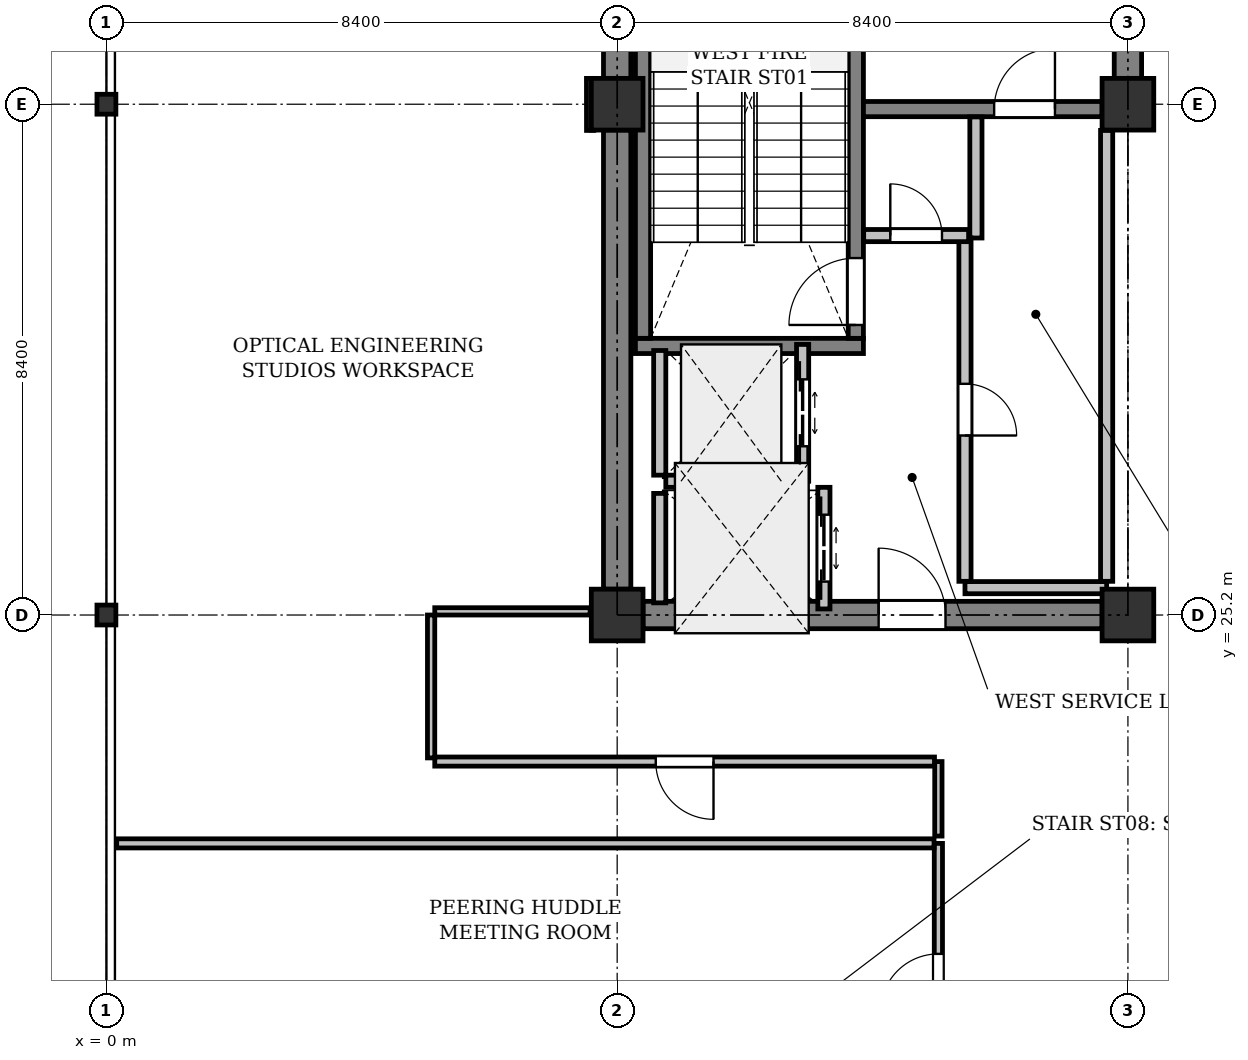
"""IFC4 building model, lengths in metres.
Left out: names, types, materials, properties, quantities, classifications, styles, units other than length and angle.
Written with IfcOpenShell. Run it as: python <this file> out.ifc"""

import sys

from ifc_helpers import new_model, si_unit, direction, frame, frame_2d, origin, origin_2d, place, context, subcontext, project, spatial, rectangle, i_section, extrude, element, fill, save


model = new_model("IFC4")
c1 = context("Model", 3, precision=1e-05, world=origin(), true_north=direction((0.0, 1.0)))
c2 = subcontext(c1, "Body", "Model", "MODEL_VIEW")
j1 = project(units=[si_unit("LENGTHUNIT", "METRE"), si_unit("PLANEANGLEUNIT", "RADIAN")], contexts=[c1])
p1 = place(None, origin())
s1 = spatial("IfcSite", under=j1, at=p1, CompositionType="ELEMENT")
p2 = place(p1, origin())
s2 = spatial("IfcBuilding", under=s1, at=p2, CompositionType="ELEMENT")
p3 = place(p2, frame((0.0, 0.0, 314.2)))
s3 = spatial("IfcBuildingStorey", under=s2, at=p3, CompositionType="ELEMENT", Elevation=314.2)
for number, where, z_axis, x_axis in (
    (1, (0.0, 25.2, 0.0), (0.0, 0.0, 1.0), (1.0, 0.0, 0.0)),
    (2, (0.0, 33.6, 0.0), (0.0, 0.0, 1.0), (1.0, 0.0, 0.0)),
):
    element("IfcColumn", number, at=place(p3, frame(where, z_axis=z_axis, x_axis=x_axis)), inside=s3, PredefinedType="COLUMN", context=c2, shape_type="SweptSolid", body=[
        extrude(i_section(OverallWidth=0.311, OverallDepth=0.327, WebThickness=0.016, FlangeThickness=0.025, FilletRadius=0.017, at=origin_2d()), origin(), (0.0, 0.0, 1.0), 4.0),
    ])
for number, where, z_axis, x_axis in (
    (3, (8.4, 25.2, 0.0), (0.0, 0.0, 1.0), (1.0, 0.0, 0.0)),
    (4, (8.4, 33.6, 0.0), (0.0, 0.0, 1.0), (1.0, 0.0, 0.0)),
    (5, (16.8, 25.2, 0.0), (0.0, 0.0, 1.0), (1.0, 0.0, 0.0)),
    (6, (16.8, 33.6, 0.0), (0.0, 0.0, 1.0), (1.0, 0.0, 0.0)),
):
    element("IfcColumn", number, at=place(p3, frame(where, z_axis=z_axis, x_axis=x_axis)), inside=s3, PredefinedType="COLUMN", context=c2, shape_type="SweptSolid", body=[
        extrude(rectangle(XDim=0.85, YDim=0.85, at=origin_2d()), origin(), (0.0, 0.0, 1.0), 4.0),
    ])
for number, where, z_axis, x_axis in (
    (7, (8.4, 25.625, 0.0), (0.0, 0.0, 1.0), (0.0, 1.0, 0.0)),
    (8, (8.4, 34.025, 0.0), (0.0, 0.0, 1.0), (0.0, 1.0, 0.0)),
):
    element("IfcWall", number, at=place(p3, frame(where, z_axis=z_axis, x_axis=x_axis)), inside=s3, PredefinedType="SHEAR", context=c2, shape_type="SweptSolid", body=[
        extrude(rectangle(XDim=7.55, YDim=0.45, at=frame_2d((3.775, 0.0))), origin(), (0.0, 0.0, 1.0), 3.725),
    ])
p4 = place(p3, frame((16.8, 34.025, 0.0), z_axis=(0.0, 0.0, 1.0), x_axis=(0.0, 1.0, 0.0)))
e9 = element("IfcWall", 9, at=p4, inside=s3, PredefinedType="SHEAR", context=c2, shape_type="SweptSolid", body=[
    extrude(rectangle(XDim=7.55, YDim=0.45, at=frame_2d((3.775, 0.0))), origin(), (0.0, 0.0, 1.0), 3.725),
])
p5 = place(p4, frame((1.075, 0.0, 0.0)))
e10 = element("IfcOpeningElement", 10, at=p5, cuts=e9, PredefinedType="OPENING", context=c2, shape_type="SweptSolid", body=[
    extrude(rectangle(XDim=1.1, YDim=2.15, at=frame_2d((0.55, 1.075))), frame((0.0, 0.235, 0.0), z_axis=(0.0, -1.0, 0.0), x_axis=(1.0, 0.0, 0.0)), (0.0, 0.0, 1.0), 0.47),
])
p6 = place(p3, frame((8.825, 25.2, 0.0), z_axis=(0.0, 0.0, 1.0), x_axis=(1.0, 0.0, 0.0)))
e11 = element("IfcWall", 11, at=p6, inside=s3, PredefinedType="SHEAR", context=c2, shape_type="SweptSolid", body=[
    extrude(rectangle(XDim=7.55, YDim=0.45, at=frame_2d((3.775, 0.0))), origin(), (0.0, 0.0, 1.0), 3.725),
])
p7 = place(p6, frame((3.875, 0.0, 0.0)))
e12 = element("IfcOpeningElement", 12, at=p7, cuts=e11, PredefinedType="OPENING", context=c2, shape_type="SweptSolid", body=[
    extrude(rectangle(XDim=1.1, YDim=2.15, at=frame_2d((0.55, 1.075))), frame((0.0, 0.235, 0.0), z_axis=(0.0, -1.0, 0.0), x_axis=(1.0, 0.0, 0.0)), (0.0, 0.0, 1.0), 0.47),
])
p8 = place(p3, frame((12.45, 29.625, 0.0), z_axis=(0.0, 0.0, 1.0), x_axis=(-1.0, 0.0, 0.0)))
e13 = element("IfcWall", 13, at=p8, inside=s3, PredefinedType="SHEAR", context=c2, shape_type="SweptSolid", body=[
    extrude(rectangle(XDim=3.75, YDim=0.25, at=frame_2d((1.875, 0.0))), origin(), (0.0, 0.0, 1.0), 3.725),
])
p9 = place(p3, frame((12.325, 29.75, 0.0), z_axis=(0.0, 0.0, 1.0), x_axis=(0.0, 1.0, 0.0)))
e14 = element("IfcWall", 14, at=p9, inside=s3, PredefinedType="SHEAR", context=c2, shape_type="SweptSolid", body=[
    extrude(rectangle(XDim=7.75, YDim=0.25, at=frame_2d((3.875, 0.0))), origin(), (0.0, 0.0, 1.0), 3.725),
])
p10 = place(p9, frame((0.22, 0.0, 0.0)))
e15 = element("IfcOpeningElement", 15, at=p10, cuts=e14, PredefinedType="OPENING", context=c2, shape_type="SweptSolid", body=[
    extrude(rectangle(XDim=1.1, YDim=2.15, at=frame_2d((0.55, 1.075))), frame((0.0, 0.135, 0.0), z_axis=(0.0, -1.0, 0.0), x_axis=(1.0, 0.0, 0.0)), (0.0, 0.0, 1.0), 0.27),
])
p11 = place(p3, frame((8.825, 29.75, 0.0), z_axis=(0.0, 0.0, 1.0), x_axis=(0.0, 1.0, 0.0)))
e16 = element("IfcWall", 16, at=p11, inside=s3, PredefinedType="SHEAR", context=c2, shape_type="SweptSolid", body=[
    extrude(rectangle(XDim=7.75, YDim=0.25, at=frame_2d((3.875, 0.0))), origin(), (0.0, 0.0, 1.0), 3.725),
])
p12 = place(p3, frame((12.45, 33.52, 0.0), z_axis=(0.0, 0.0, 1.0), x_axis=(1.0, 0.0, 0.0)))
e17 = element("IfcWall", 17, at=p12, inside=s3, PredefinedType="SHEAR", context=c2, shape_type="SweptSolid", body=[
    extrude(rectangle(XDim=3.925, YDim=0.25, at=frame_2d((1.962, 0.0))), origin(), (0.0, 0.0, 1.0), 3.725),
])
p13 = place(p12, frame((2.15, 0.0, 0.0)))
e18 = element("IfcOpeningElement", 18, at=p13, cuts=e17, PredefinedType="OPENING", context=c2, shape_type="SweptSolid", body=[
    extrude(rectangle(XDim=1.0, YDim=2.15, at=frame_2d((0.5, 1.075))), frame((0.0, 0.135, 0.0), z_axis=(0.0, -1.0, 0.0), x_axis=(1.0, 0.0, 0.0)), (0.0, 0.0, 1.0), 0.27),
])
p14 = place(p3, frame((11.45, 27.4, 0.0), z_axis=(0.0, 0.0, 1.0), x_axis=(0.0, 1.0, 0.0)))
e19 = element("IfcWall", 19, at=p14, inside=s3, PredefinedType="PARTITIONING", context=c2, shape_type="SweptSolid", body=[
    extrude(rectangle(XDim=2.25, YDim=0.2, at=frame_2d((1.125, 0.0))), origin(), (0.0, 0.0, 1.0), 3.725),
])
p15 = place(p14, frame((0.575, 0.0, 0.0)))
e20 = element("IfcOpeningElement", 20, at=p15, cuts=e19, PredefinedType="OPENING", context=c2, shape_type="SweptSolid", body=[
    extrude(rectangle(XDim=1.1, YDim=2.2, at=frame_2d((0.55, 1.1))), frame((0.0, 0.11, 0.0), z_axis=(0.0, -1.0, 0.0), x_axis=(1.0, 0.0, 0.0)), (0.0, 0.0, 1.0), 0.22),
])
p16 = place(p3, frame((9.1, 27.5, 0.0), z_axis=(0.0, 0.0, 1.0), x_axis=(0.0, 1.0, 0.0)))
e21 = element("IfcWall", 21, at=p16, inside=s3, PredefinedType="PARTITIONING", context=c2, shape_type="SweptSolid", body=[
    extrude(rectangle(XDim=2.05, YDim=0.2, at=frame_2d((1.025, 0.0))), origin(), (0.0, 0.0, 1.0), 3.725),
])
p17 = place(p3, frame((9.2, 27.4, 0.0), z_axis=(0.0, 0.0, 1.0), x_axis=(1.0, 0.0, 0.0)))
e22 = element("IfcWall", 22, at=p17, inside=s3, PredefinedType="PARTITIONING", context=c2, shape_type="SweptSolid", body=[
    extrude(rectangle(XDim=2.15, YDim=0.2, at=frame_2d((1.075, 0.0))), origin(), (0.0, 0.0, 1.0), 3.725),
])
p18 = place(p3, frame((11.8, 25.3, 0.0), z_axis=(0.0, 0.0, 1.0), x_axis=(0.0, 1.0, 0.0)))
e23 = element("IfcWall", 23, at=p18, inside=s3, PredefinedType="PARTITIONING", context=c2, shape_type="SweptSolid", body=[
    extrude(rectangle(XDim=2.0, YDim=0.2, at=frame_2d((1.0, 0.0))), origin(), (0.0, 0.0, 1.0), 3.725),
])
p19 = place(p18, frame((0.45, 0.0, 0.0)))
e24 = element("IfcOpeningElement", 24, at=p19, cuts=e23, PredefinedType="OPENING", context=c2, shape_type="SweptSolid", body=[
    extrude(rectangle(XDim=1.1, YDim=2.2, at=frame_2d((0.55, 1.1))), frame((0.0, 0.11, 0.0), z_axis=(0.0, -1.0, 0.0), x_axis=(1.0, 0.0, 0.0)), (0.0, 0.0, 1.0), 0.22),
])
p20 = place(p3, frame((9.1, 25.4, 0.0), z_axis=(0.0, 0.0, 1.0), x_axis=(0.0, 1.0, 0.0)))
e25 = element("IfcWall", 25, at=p20, inside=s3, PredefinedType="PARTITIONING", context=c2, shape_type="SweptSolid", body=[
    extrude(rectangle(XDim=1.8, YDim=0.2, at=frame_2d((0.9, 0.0))), origin(), (0.0, 0.0, 1.0), 3.725),
])
p21 = place(p3, frame((14.12, 25.65, 0.0), z_axis=(0.0, 0.0, 1.0), x_axis=(1.0, 0.0, 0.0)))
e26 = element("IfcWall", 26, at=p21, inside=s3, PredefinedType="PARTITIONING", context=c2, shape_type="SweptSolid", body=[
    extrude(rectangle(XDim=2.33, YDim=0.2, at=frame_2d((1.165, 0.0))), origin(), (0.0, 0.0, 1.0), 3.725),
])
p22 = place(p3, frame((16.45, 25.754, 0.0), z_axis=(0.0, 0.0, 1.0), x_axis=(0.0, 1.0, 0.0)))
e27 = element("IfcWall", 27, at=p22, inside=s3, PredefinedType="PARTITIONING", context=c2, shape_type="SweptSolid", body=[
    extrude(rectangle(XDim=7.416, YDim=0.2, at=frame_2d((3.708, 0.0))), origin(), (0.0, 0.0, 1.0), 3.725),
])
p23 = place(p3, frame((14.3, 33.391, 0.0), z_axis=(0.0, 0.0, 1.0), x_axis=(0.0, -1.0, 0.0)))
e28 = element("IfcWall", 28, at=p23, inside=s3, PredefinedType="PARTITIONING", context=c2, shape_type="SweptSolid", body=[
    extrude(rectangle(XDim=1.991, YDim=0.2, at=frame_2d((0.996, 0.0))), origin(), (0.0, 0.0, 1.0), 3.725),
])
p24 = place(p3, frame((14.12, 31.4, 0.0), z_axis=(0.0, 0.0, 1.0), x_axis=(0.0, -1.0, 0.0)))
e29 = element("IfcWall", 29, at=p24, inside=s3, PredefinedType="PARTITIONING", context=c2, shape_type="SweptSolid", body=[
    extrude(rectangle(XDim=5.646, YDim=0.2, at=frame_2d((2.823, 0.0))), origin(), (0.0, 0.0, 1.0), 3.725),
])
p25 = place(p24, frame((2.398, 0.0, 0.0)))
e30 = element("IfcOpeningElement", 30, at=p25, cuts=e29, PredefinedType="OPENING", context=c2, shape_type="SweptSolid", body=[
    extrude(rectangle(XDim=0.85, YDim=2.15, at=frame_2d((0.425, 1.075))), frame((0.0, 0.11, 0.0), z_axis=(0.0, -1.0, 0.0), x_axis=(1.0, 0.0, 0.0)), (0.0, 0.0, 1.0), 0.22),
])
p26 = place(p3, frame((12.454, 31.44, 0.0), z_axis=(0.0, 0.0, 1.0), x_axis=(1.0, 0.0, 0.0)))
e31 = element("IfcWall", 31, at=p26, inside=s3, PredefinedType="PARTITIONING", context=c2, shape_type="SweptSolid", body=[
    extrude(rectangle(XDim=1.726, YDim=0.2, at=frame_2d((0.863, 0.0))), origin(), (0.0, 0.0, 1.0), 3.725),
])
p27 = place(p26, frame((0.438, 0.0, 0.0)))
e32 = element("IfcOpeningElement", 32, at=p27, cuts=e31, PredefinedType="OPENING", context=c2, shape_type="SweptSolid", body=[
    extrude(rectangle(XDim=0.85, YDim=2.15, at=frame_2d((0.425, 1.075))), frame((0.0, 0.11, 0.0), z_axis=(0.0, -1.0, 0.0), x_axis=(1.0, 0.0, 0.0)), (0.0, 0.0, 1.0), 0.22),
])
p28 = place(p3, frame((5.34, 23.214, 0.0), z_axis=(0.0, 0.0, 1.0), x_axis=(-1.0, 0.0, 0.0)))
e33 = element("IfcWall", 33, at=p28, inside=s3, PredefinedType="PARTITIONING", context=c2, shape_type="SweptSolid", body=[
    extrude(rectangle(XDim=5.171, YDim=0.135, at=frame_2d((2.585, 0.0))), origin(), (0.0, 0.0, 1.0), 3.421),
])
p29 = place(p3, frame((0.169, 20.187, 0.0), z_axis=(0.0, 0.0, 1.0), x_axis=(1.0, 0.0, 0.0)))
e34 = element("IfcWall", 34, at=p29, inside=s3, PredefinedType="PARTITIONING", context=c2, shape_type="SweptSolid", body=[
    extrude(rectangle(XDim=13.921, YDim=0.15, at=frame_2d((6.96, 0.0))), origin(), (0.0, 0.0, 1.0), 3.319),
])
p30 = place(p3, frame((14.09, 20.266, 0.0), z_axis=(0.0, 0.0, 1.0), x_axis=(0.0, 1.0, 0.0)))
e35 = element("IfcWall", 35, at=p30, inside=s3, PredefinedType="PARTITIONING", context=c2, shape_type="SweptSolid", body=[
    extrude(rectangle(XDim=2.524, YDim=0.12, at=frame_2d((1.262, 0.0))), origin(), (0.0, 0.0, 1.0), 3.725),
])
p31 = place(p3, frame((14.026, 22.79, 0.0), z_axis=(0.0, 0.0, 1.0), x_axis=(-1.0, 0.0, 0.0)))
e36 = element("IfcWall", 36, at=p31, inside=s3, PredefinedType="PARTITIONING", context=c2, shape_type="SweptSolid", body=[
    extrude(rectangle(XDim=8.626, YDim=0.15, at=frame_2d((4.313, 0.0))), origin(), (0.0, 0.0, 1.0), 3.319),
])
p32 = place(p31, frame((3.838, 0.0, 0.0)))
e37 = element("IfcOpeningElement", 37, at=p32, cuts=e36, PredefinedType="OPENING", context=c2, shape_type="SweptSolid", body=[
    extrude(rectangle(XDim=0.95, YDim=2.15, at=frame_2d((0.475, 1.075))), frame((0.0, 0.085, 0.0), z_axis=(0.0, -1.0, 0.0), x_axis=(1.0, 0.0, 0.0)), (0.0, 0.0, 1.0), 0.17),
])
p33 = place(p3, frame((14.09, 12.589, 0.0), z_axis=(0.0, 0.0, 1.0), x_axis=(0.0, 1.0, 0.0)))
e38 = element("IfcWall", 38, at=p33, inside=s3, PredefinedType="PARTITIONING", context=c2, shape_type="SweptSolid", body=[
    extrude(rectangle(XDim=7.478, YDim=0.15, at=frame_2d((3.739, 0.0))), origin(), (0.0, 0.0, 1.0), 3.271),
])
p34 = place(p33, frame((3.264, 0.0, 0.0)))
e39 = element("IfcOpeningElement", 39, at=p34, cuts=e38, PredefinedType="OPENING", context=c2, shape_type="SweptSolid", body=[
    extrude(rectangle(XDim=0.95, YDim=2.15, at=frame_2d((0.475, 1.075))), frame((0.0, 0.085, 0.0), z_axis=(0.0, -1.0, 0.0), x_axis=(1.0, 0.0, 0.0)), (0.0, 0.0, 1.0), 0.17),
])
p35 = place(p3, frame((5.34, 23.334, 0.0), z_axis=(0.0, 0.0, 1.0), x_axis=(0.0, 1.0, 0.0)))
e40 = element("IfcWall", 40, at=p35, inside=s3, PredefinedType="PARTITIONING", context=c2, shape_type="SweptSolid", body=[
    extrude(rectangle(XDim=1.865, YDim=0.12, at=frame_2d((0.933, 0.0))), origin(), (0.0, 0.0, 1.0), 3.271),
])
p36 = place(p3, frame((5.4, 25.26, 0.0), z_axis=(0.0, 0.0, 1.0), x_axis=(1.0, 0.0, 0.0)))
e41 = element("IfcWall", 41, at=p36, inside=s3, PredefinedType="PARTITIONING", context=c2, shape_type="SweptSolid", body=[
    extrude(rectangle(XDim=2.555, YDim=0.12, at=frame_2d((1.278, 0.0))), origin(), (0.0, 0.0, 1.0), 3.271),
])
p37 = place(p36, frame((0.802, 0.0, 0.0)))
e42 = element("IfcOpeningElement", 42, at=p37, cuts=e41, PredefinedType="OPENING", context=c2, shape_type="SweptSolid", body=[
    extrude(rectangle(XDim=0.95, YDim=2.15, at=frame_2d((0.475, 1.075))), frame((0.0, 0.07, 0.0), z_axis=(0.0, -1.0, 0.0), x_axis=(1.0, 0.0, 0.0)), (0.0, 0.0, 1.0), 0.14),
])
p38 = place(p3, frame((7.956, 33.169, 0.0), z_axis=(0.0, 0.0, 1.0), x_axis=(-0.000855919801, 0.999999633701, 0.0)))
e43 = element("IfcWall", 43, at=p38, inside=s3, PredefinedType="PARTITIONING", context=c2, shape_type="SweptSolid", body=[
    extrude(rectangle(XDim=0.856, YDim=0.12, at=frame_2d((0.428, 0.0))), origin(), (0.0, 0.0, 1.0), 3.271),
])
p39 = place(p7, origin())
e44 = element("IfcDoor", 44, at=p39, inside=s3, OperationType="SINGLE_SWING_RIGHT", PredefinedType="DOOR", context=c2, shape_type="SweptSolid", body=[
    extrude(rectangle(XDim=1.1, YDim=2.15, at=frame_2d((0.55, 1.075))), frame((0.0, 0.025, 0.0), z_axis=(0.0, -1.0, 0.0), x_axis=(1.0, 0.0, 0.0)), (0.0, 0.0, 1.0), 0.05),
])
fill(e12, e44)
p40 = place(p10, origin())
e45 = element("IfcDoor", 45, at=p40, inside=s3, OperationType="SINGLE_SWING_RIGHT", PredefinedType="DOOR", context=c2, shape_type="SweptSolid", body=[
    extrude(rectangle(XDim=1.1, YDim=2.15, at=frame_2d((0.55, 1.075))), frame((0.0, 0.025, 0.0), z_axis=(0.0, -1.0, 0.0), x_axis=(1.0, 0.0, 0.0)), (0.0, 0.0, 1.0), 0.05),
])
fill(e15, e45)
p41 = place(p13, origin())
e46 = element("IfcDoor", 46, at=p41, inside=s3, OperationType="SINGLE_SWING_RIGHT", PredefinedType="DOOR", context=c2, shape_type="SweptSolid", body=[
    extrude(rectangle(XDim=1.0, YDim=2.15, at=frame_2d((0.5, 1.075))), frame((0.0, 0.025, 0.0), z_axis=(0.0, -1.0, 0.0), x_axis=(1.0, 0.0, 0.0)), (0.0, 0.0, 1.0), 0.05),
])
fill(e18, e46)
p42 = place(p15, origin())
e47 = element("IfcDoor", 47, at=p42, inside=s3, OperationType="DOUBLE_DOOR_SLIDING", PredefinedType="DOOR", context=c2, shape_type="SweptSolid", body=[
    extrude(rectangle(XDim=1.1, YDim=2.2, at=frame_2d((0.55, 1.1))), frame((0.0, 0.025, 0.0), z_axis=(0.0, -1.0, 0.0), x_axis=(1.0, 0.0, 0.0)), (0.0, 0.0, 1.0), 0.05),
])
fill(e20, e47)
p43 = place(p19, origin())
e48 = element("IfcDoor", 48, at=p43, inside=s3, OperationType="DOUBLE_DOOR_SLIDING", PredefinedType="DOOR", context=c2, shape_type="SweptSolid", body=[
    extrude(rectangle(XDim=1.1, YDim=2.2, at=frame_2d((0.55, 1.1))), frame((0.0, 0.025, 0.0), z_axis=(0.0, -1.0, 0.0), x_axis=(1.0, 0.0, 0.0)), (0.0, 0.0, 1.0), 0.05),
])
fill(e24, e48)
p44 = place(p25, origin())
e49 = element("IfcDoor", 49, at=p44, inside=s3, OperationType="SINGLE_SWING_RIGHT", PredefinedType="DOOR", context=c2, shape_type="SweptSolid", body=[
    extrude(rectangle(XDim=0.85, YDim=2.15, at=frame_2d((0.425, 1.075))), frame((0.0, 0.025, 0.0), z_axis=(0.0, -1.0, 0.0), x_axis=(1.0, 0.0, 0.0)), (0.0, 0.0, 1.0), 0.05),
])
fill(e30, e49)
p45 = place(p27, origin())
e50 = element("IfcDoor", 50, at=p45, inside=s3, OperationType="SINGLE_SWING_LEFT", PredefinedType="DOOR", context=c2, shape_type="SweptSolid", body=[
    extrude(rectangle(XDim=0.85, YDim=2.15, at=frame_2d((0.425, 1.075))), frame((0.0, 0.025, 0.0), z_axis=(0.0, -1.0, 0.0), x_axis=(1.0, 0.0, 0.0)), (0.0, 0.0, 1.0), 0.05),
])
fill(e32, e50)
p46 = place(p32, origin())
e51 = element("IfcDoor", 51, at=p46, inside=s3, OperationType="SINGLE_SWING_LEFT", PredefinedType="DOOR", context=c2, shape_type="SweptSolid", body=[
    extrude(rectangle(XDim=0.95, YDim=2.15, at=frame_2d((0.475, 1.075))), frame((0.0, 0.025, 0.0), z_axis=(0.0, -1.0, 0.0), x_axis=(1.0, 0.0, 0.0)), (0.0, 0.0, 1.0), 0.05),
])
fill(e37, e51)
p47 = place(p37, origin())
e52 = element("IfcDoor", 52, at=p47, inside=s3, OperationType="SINGLE_SWING_LEFT", PredefinedType="DOOR", context=c2, shape_type="SweptSolid", body=[
    extrude(rectangle(XDim=0.95, YDim=2.15, at=frame_2d((0.475, 1.075))), frame((0.0, 0.025, 0.0), z_axis=(0.0, -1.0, 0.0), x_axis=(1.0, 0.0, 0.0)), (0.0, 0.0, 1.0), 0.05),
])
fill(e42, e52)
save(model, sys.argv[1])
